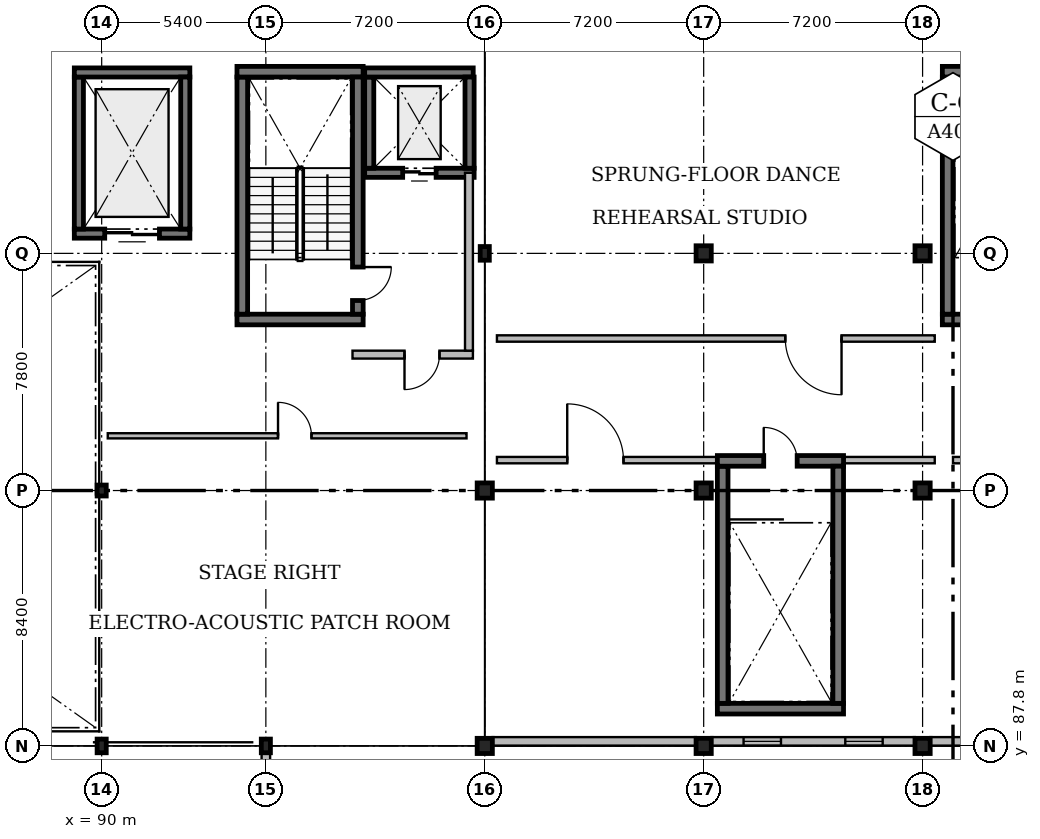
"""IFC4 building model, lengths in metres.
Left out: names, types, materials, properties, quantities, classifications, styles, units other than length and angle.
Written with IfcOpenShell. Run it as: python <this file> out.ifc"""

import sys

from ifc_helpers import new_model, si_unit, direction, frame, frame_2d, origin, origin_2d, place, context, subcontext, project, spatial, rectangle, i_section, extrude, element, fill, save


model = new_model("IFC4")
c1 = context("Model", 3, precision=1e-05, world=origin(), true_north=direction((0.0, 1.0)))
c2 = subcontext(c1, "Body", "Model", "MODEL_VIEW")
j1 = project(units=[si_unit("LENGTHUNIT", "METRE"), si_unit("PLANEANGLEUNIT", "RADIAN")], contexts=[c1])
p1 = place(None, origin())
s1 = spatial("IfcSite", under=j1, at=p1, CompositionType="ELEMENT")
p2 = place(p1, origin())
s2 = spatial("IfcBuilding", under=s1, at=p2, CompositionType="ELEMENT")
p3 = place(p2, frame((0.0, 0.0, 13.2)))
s3 = spatial("IfcBuildingStorey", under=s2, at=p3, CompositionType="ELEMENT", Elevation=13.2)
p4 = place(p3, frame((90.0, 87.8, 0.0), z_axis=(0.0, 0.0, 1.0), x_axis=(1.0, 0.0, 0.0)))
e1 = element("IfcColumn", 1, at=p4, inside=s3, PredefinedType="COLUMN", context=c2, shape_type="SweptSolid", body=[
    extrude(i_section(OverallWidth=0.3, OverallDepth=0.45, WebThickness=0.014, FlangeThickness=0.026, FilletRadius=0.027, at=origin_2d()), origin(), (0.0, 0.0, 1.0), 3.9),
])
p5 = place(p3, frame((90.0, 96.2, 0.0), z_axis=(0.0, 0.0, 1.0), x_axis=(1.0, 0.0, 0.0)))
e2 = element("IfcColumn", 2, at=p5, inside=s3, PredefinedType="COLUMN", context=c2, shape_type="SweptSolid", body=[
    extrude(i_section(OverallWidth=0.3, OverallDepth=0.36, WebThickness=0.012, FlangeThickness=0.022, FilletRadius=0.027, at=origin_2d()), origin(), (0.0, 0.0, 1.0), 3.9),
])
p6 = place(p3, frame((95.4, 87.8, 0.0), z_axis=(0.0, 0.0, 1.0), x_axis=(1.0, 0.0, 0.0)))
e3 = element("IfcColumn", 3, at=p6, inside=s3, PredefinedType="COLUMN", context=c2, shape_type="SweptSolid", body=[
    extrude(i_section(OverallWidth=0.3, OverallDepth=0.45, WebThickness=0.014, FlangeThickness=0.026, FilletRadius=0.027, at=origin_2d()), origin(), (0.0, 0.0, 1.0), 3.9),
])
for number, where, z_axis, x_axis in (
    (4, (102.6, 87.8, 0.0), (0.0, 0.0, 1.0), (1.0, 0.0, 0.0)),
    (5, (102.6, 96.2, 0.0), (0.0, 0.0, 1.0), (1.0, 0.0, 0.0)),
):
    element("IfcColumn", number, at=place(p3, frame(where, z_axis=z_axis, x_axis=x_axis)), inside=s3, PredefinedType="COLUMN", context=c2, shape_type="SweptSolid", body=[
        extrude(rectangle(XDim=0.5, YDim=0.5, at=origin_2d()), origin(), (0.0, 0.0, 1.0), 3.9),
    ])
p7 = place(p3, frame((102.6, 104.0, 0.0), z_axis=(0.0, 0.0, 1.0), x_axis=(1.0, 0.0, 0.0)))
e6 = element("IfcColumn", 6, at=p7, inside=s3, PredefinedType="COLUMN", context=c2, shape_type="SweptSolid", body=[
    extrude(i_section(OverallWidth=0.3, OverallDepth=0.45, WebThickness=0.014, FlangeThickness=0.026, FilletRadius=0.027, at=origin_2d()), origin(), (0.0, 0.0, 1.0), 3.9),
])
for number, where, z_axis, x_axis in (
    (7, (109.8, 87.8, 0.0), (0.0, 0.0, 1.0), (1.0, 0.0, 0.0)),
    (8, (109.8, 96.2, 0.0), (0.0, 0.0, 1.0), (1.0, 0.0, 0.0)),
    (9, (109.8, 104.0, 0.0), (0.0, 0.0, 1.0), (1.0, 0.0, 0.0)),
    (10, (117.0, 87.8, 0.0), (0.0, 0.0, 1.0), (1.0, 0.0, 0.0)),
    (11, (117.0, 96.2, 0.0), (0.0, 0.0, 1.0), (1.0, 0.0, 0.0)),
    (12, (117.0, 104.0, 0.0), (0.0, 0.0, 1.0), (1.0, 0.0, 0.0)),
):
    element("IfcColumn", number, at=place(p3, frame(where, z_axis=z_axis, x_axis=x_axis)), inside=s3, PredefinedType="COLUMN", context=c2, shape_type="SweptSolid", body=[
        extrude(rectangle(XDim=0.5, YDim=0.5, at=origin_2d()), origin(), (0.0, 0.0, 1.0), 3.71),
    ])
p8 = place(p3, frame((98.6, 101.825, 0.0), z_axis=(0.0, 0.0, 1.0), x_axis=(-1.0, 0.0, 0.0)))
e13 = element("IfcWall", 13, at=p8, inside=s3, PredefinedType="SOLIDWALL", context=c2, shape_type="SweptSolid", body=[
    extrude(rectangle(XDim=4.15, YDim=0.35, at=frame_2d((2.075, 0.0))), origin(), (0.0, 0.0, 1.0), 3.9),
])
p9 = place(p3, frame((94.625, 102.0, 0.0), z_axis=(0.0, 0.0, 1.0), x_axis=(0.0, 1.0, 0.0)))
e14 = element("IfcWall", 14, at=p9, inside=s3, PredefinedType="SOLIDWALL", context=c2, shape_type="SweptSolid", body=[
    extrude(rectangle(XDim=7.8, YDim=0.35, at=frame_2d((3.9, 0.0))), origin(), (0.0, 0.0, 1.0), 3.9),
])
p10 = place(p3, frame((94.45, 109.975, 0.0), z_axis=(0.0, 0.0, 1.0), x_axis=(1.0, 0.0, 0.0)))
e15 = element("IfcWall", 15, at=p10, inside=s3, PredefinedType="SOLIDWALL", context=c2, shape_type="SweptSolid", body=[
    extrude(rectangle(XDim=4.15, YDim=0.35, at=frame_2d((2.075, 0.0))), origin(), (0.0, 0.0, 1.0), 3.9),
])
p11 = place(p3, frame((98.425, 109.8, 0.0), z_axis=(0.0, 0.0, 1.0), x_axis=(0.0, -1.0, 0.0)))
e16 = element("IfcWall", 16, at=p11, inside=s3, PredefinedType="SOLIDWALL", context=c2, shape_type="SweptSolid", body=[
    extrude(rectangle(XDim=7.8, YDim=0.35, at=frame_2d((3.9, 0.0))), origin(), (0.0, 0.0, 1.0), 3.9),
])
p12 = place(p11, frame((6.25, 0.0, 0.0)))
e17 = element("IfcOpeningElement", 17, at=p12, cuts=e16, PredefinedType="OPENING", context=c2, shape_type="SweptSolid", body=[
    extrude(rectangle(XDim=1.1, YDim=2.15, at=frame_2d((0.55, 1.075))), frame((0.0, 0.195, 0.0), z_axis=(0.0, -1.0, 0.0), x_axis=(1.0, 0.0, 0.0)), (0.0, 0.0, 1.0), 0.39),
])
p13 = place(p3, frame((102.25, 106.65, 0.0), z_axis=(0.0, 0.0, 1.0), x_axis=(-1.0, 0.0, 0.0)))
e18 = element("IfcWall", 18, at=p13, inside=s3, PredefinedType="SOLIDWALL", context=c2, shape_type="SweptSolid", body=[
    extrude(rectangle(XDim=3.6, YDim=0.3, at=frame_2d((1.8, 0.0))), origin(), (0.0, 0.0, 1.0), 3.9),
])
p14 = place(p13, frame((1.25, 0.0, 0.0)))
e19 = element("IfcOpeningElement", 19, at=p14, cuts=e18, PredefinedType="OPENING", context=c2, shape_type="SweptSolid", body=[
    extrude(rectangle(XDim=1.1, YDim=2.1, at=frame_2d((0.55, 1.05))), frame((0.0, 0.17, 0.0), z_axis=(0.0, -1.0, 0.0), x_axis=(1.0, 0.0, 0.0)), (0.0, 0.0, 1.0), 0.34),
])
p15 = place(p3, frame((98.8, 106.8, 0.0), z_axis=(0.0, 0.0, 1.0), x_axis=(0.0, 1.0, 0.0)))
e20 = element("IfcWall", 20, at=p15, inside=s3, PredefinedType="SOLIDWALL", context=c2, shape_type="SweptSolid", body=[
    extrude(rectangle(XDim=3.0, YDim=0.3, at=frame_2d((1.5, 0.0))), origin(), (0.0, 0.0, 1.0), 3.9),
])
p16 = place(p3, frame((98.65, 109.95, 0.0), z_axis=(0.0, 0.0, 1.0), x_axis=(1.0, 0.0, 0.0)))
e21 = element("IfcWall", 21, at=p16, inside=s3, PredefinedType="SOLIDWALL", context=c2, shape_type="SweptSolid", body=[
    extrude(rectangle(XDim=3.57, YDim=0.3, at=frame_2d((1.785, 0.0))), origin(), (0.0, 0.0, 1.0), 3.9),
])
p17 = place(p3, frame((102.1, 109.8, 0.0), z_axis=(0.0, 0.0, 1.0), x_axis=(0.0, -1.0, 0.0)))
e22 = element("IfcWall", 22, at=p17, inside=s3, PredefinedType="SOLIDWALL", context=c2, shape_type="SweptSolid", body=[
    extrude(rectangle(XDim=3.0, YDim=0.3, at=frame_2d((1.5, 0.0))), origin(), (0.0, 0.0, 1.0), 3.9),
])
p18 = place(p3, frame((102.21, 100.67, 0.0), z_axis=(0.0, 0.0, 1.0), x_axis=(-1.0, 0.0, 0.0)))
e23 = element("IfcWall", 23, at=p18, inside=s3, PredefinedType="SOLIDWALL", context=c2, shape_type="SweptSolid", body=[
    extrude(rectangle(XDim=3.96, YDim=0.26, at=frame_2d((1.98, 0.0))), origin(), (0.0, 0.0, 1.0), 3.65),
])
p19 = place(p18, frame((1.1, 0.0, 0.0)))
e24 = element("IfcOpeningElement", 24, at=p19, cuts=e23, PredefinedType="OPENING", context=c2, shape_type="SweptSolid", body=[
    extrude(rectangle(XDim=1.15, YDim=2.2, at=frame_2d((0.575, 1.1))), frame((0.0, 0.15, 0.0), z_axis=(0.0, -1.0, 0.0), x_axis=(1.0, 0.0, 0.0)), (0.0, 0.0, 1.0), 0.3),
])
p20 = place(p3, frame((102.08, 106.65, 0.0), z_axis=(0.0, 0.0, 1.0), x_axis=(0.0, -1.0, 0.0)))
e25 = element("IfcWall", 25, at=p20, inside=s3, PredefinedType="SOLIDWALL", context=c2, shape_type="SweptSolid", body=[
    extrude(rectangle(XDim=5.85, YDim=0.26, at=frame_2d((2.925, 0.0))), origin(), (0.0, 0.0, 1.0), 3.65),
])
p21 = place(p3, frame((121.8, 101.825, 0.0), z_axis=(0.0, 0.0, 1.0), x_axis=(-1.0, 0.0, 0.0)))
e26 = element("IfcWall", 26, at=p21, inside=s3, PredefinedType="SOLIDWALL", context=c2, shape_type="SweptSolid", body=[
    extrude(rectangle(XDim=4.15, YDim=0.35, at=frame_2d((2.075, 0.0))), origin(), (0.0, 0.0, 1.0), 3.6),
])
p22 = place(p21, frame((1.525, 0.0, 0.0)))
e27 = element("IfcOpeningElement", 27, at=p22, cuts=e26, PredefinedType="OPENING", context=c2, shape_type="SweptSolid", body=[
    extrude(rectangle(XDim=1.1, YDim=2.15, at=frame_2d((0.55, 1.075))), frame((0.0, 0.195, 0.0), z_axis=(0.0, -1.0, 0.0), x_axis=(1.0, 0.0, 0.0)), (0.0, 0.0, 1.0), 0.39),
])
p23 = place(p3, frame((117.825, 102.0, 0.0), z_axis=(0.0, 0.0, 1.0), x_axis=(0.0, 1.0, 0.0)))
e28 = element("IfcWall", 28, at=p23, inside=s3, PredefinedType="SOLIDWALL", context=c2, shape_type="SweptSolid", body=[
    extrude(rectangle(XDim=7.8, YDim=0.35, at=frame_2d((3.9, 0.0))), origin(), (0.0, 0.0, 1.0), 3.6),
])
p24 = place(p3, frame((117.65, 109.975, 0.0), z_axis=(0.0, 0.0, 1.0), x_axis=(1.0, 0.0, 0.0)))
e29 = element("IfcWall", 29, at=p24, inside=s3, PredefinedType="SOLIDWALL", context=c2, shape_type="SweptSolid", body=[
    extrude(rectangle(XDim=4.15, YDim=0.35, at=frame_2d((2.075, 0.0))), origin(), (0.0, 0.0, 1.0), 3.6),
])
p25 = place(p3, frame((114.4, 89.025, 0.0), z_axis=(0.0, 0.0, 1.0), x_axis=(-1.0, 0.0, 0.0)))
e30 = element("IfcWall", 30, at=p25, inside=s3, PredefinedType="SOLIDWALL", context=c2, shape_type="SweptSolid", body=[
    extrude(rectangle(XDim=4.15, YDim=0.35, at=frame_2d((2.075, 0.0))), origin(), (0.0, 0.0, 1.0), 3.6),
])
p26 = place(p3, frame((110.425, 89.2, 0.0), z_axis=(0.0, 0.0, 1.0), x_axis=(0.0, 1.0, 0.0)))
e31 = element("IfcWall", 31, at=p26, inside=s3, PredefinedType="SOLIDWALL", context=c2, shape_type="SweptSolid", body=[
    extrude(rectangle(XDim=7.8, YDim=0.35, at=frame_2d((3.9, 0.0))), origin(), (0.0, 0.0, 1.0), 3.6),
])
p27 = place(p3, frame((110.25, 97.175, 0.0), z_axis=(0.0, 0.0, 1.0), x_axis=(1.0, 0.0, 0.0)))
e32 = element("IfcWall", 32, at=p27, inside=s3, PredefinedType="SOLIDWALL", context=c2, shape_type="SweptSolid", body=[
    extrude(rectangle(XDim=4.15, YDim=0.35, at=frame_2d((2.075, 0.0))), origin(), (0.0, 0.0, 1.0), 3.6),
])
p28 = place(p27, frame((1.525, 0.0, 0.0)))
e33 = element("IfcOpeningElement", 33, at=p28, cuts=e32, PredefinedType="OPENING", context=c2, shape_type="SweptSolid", body=[
    extrude(rectangle(XDim=1.1, YDim=2.15, at=frame_2d((0.55, 1.075))), frame((0.0, 0.195, 0.0), z_axis=(0.0, -1.0, 0.0), x_axis=(1.0, 0.0, 0.0)), (0.0, 0.0, 1.0), 0.39),
])
p29 = place(p3, frame((114.225, 97.0, 0.0), z_axis=(0.0, 0.0, 1.0), x_axis=(0.0, -1.0, 0.0)))
e34 = element("IfcWall", 34, at=p29, inside=s3, PredefinedType="SOLIDWALL", context=c2, shape_type="SweptSolid", body=[
    extrude(rectangle(XDim=7.8, YDim=0.35, at=frame_2d((3.9, 0.0))), origin(), (0.0, 0.0, 1.0), 3.6),
])
p30 = place(p3, frame((92.9, 104.65, 0.0), z_axis=(0.0, 0.0, 1.0), x_axis=(-1.0, 0.0, 0.0)))
e35 = element("IfcWall", 35, at=p30, inside=s3, PredefinedType="SOLIDWALL", context=c2, shape_type="SweptSolid", body=[
    extrude(rectangle(XDim=3.8, YDim=0.3, at=frame_2d((1.9, 0.0))), origin(), (0.0, 0.0, 1.0), 3.9),
])
p31 = place(p30, frame((1.0, 0.0, 0.0)))
e36 = element("IfcOpeningElement", 36, at=p31, cuts=e35, PredefinedType="OPENING", context=c2, shape_type="SweptSolid", body=[
    extrude(rectangle(XDim=1.8, YDim=2.4, at=frame_2d((0.9, 1.2))), frame((0.0, 0.17, 0.0), z_axis=(0.0, -1.0, 0.0), x_axis=(1.0, 0.0, 0.0)), (0.0, 0.0, 1.0), 0.34),
])
p32 = place(p3, frame((89.25, 104.8, 0.0), z_axis=(0.0, 0.0, 1.0), x_axis=(0.0, 1.0, 0.0)))
e37 = element("IfcWall", 37, at=p32, inside=s3, PredefinedType="SOLIDWALL", context=c2, shape_type="SweptSolid", body=[
    extrude(rectangle(XDim=5.0, YDim=0.3, at=frame_2d((2.5, 0.0))), origin(), (0.0, 0.0, 1.0), 3.9),
])
p33 = place(p3, frame((89.1, 109.95, 0.0), z_axis=(0.0, 0.0, 1.0), x_axis=(1.0, 0.0, 0.0)))
e38 = element("IfcWall", 38, at=p33, inside=s3, PredefinedType="SOLIDWALL", context=c2, shape_type="SweptSolid", body=[
    extrude(rectangle(XDim=3.8, YDim=0.3, at=frame_2d((1.9, 0.0))), origin(), (0.0, 0.0, 1.0), 3.9),
])
p34 = place(p3, frame((92.75, 109.8, 0.0), z_axis=(0.0, 0.0, 1.0), x_axis=(0.0, -1.0, 0.0)))
e39 = element("IfcWall", 39, at=p34, inside=s3, PredefinedType="SOLIDWALL", context=c2, shape_type="SweptSolid", body=[
    extrude(rectangle(XDim=5.0, YDim=0.3, at=frame_2d((2.5, 0.0))), origin(), (0.0, 0.0, 1.0), 3.9),
])
p35 = place(p3, frame((95.4, 85.387, -0.02), z_axis=(0.0, 0.0, 1.0), x_axis=(0.0, 1.0, 0.0)))
e40 = element("IfcWall", 40, at=p35, inside=s3, PredefinedType="SOLIDWALL", context=c2, shape_type="SweptSolid", body=[
    extrude(rectangle(XDim=2.183, YDim=0.28, at=frame_2d((1.092, 0.0))), origin(), (0.0, 0.0, 1.0), 2.505),
])
p36 = place(p35, frame((0.392, 0.0, 0.35)))
e41 = element("IfcOpeningElement", 41, at=p36, cuts=e40, PredefinedType="OPENING", context=c2, shape_type="SweptSolid", body=[
    extrude(rectangle(XDim=1.4, YDim=1.8, at=frame_2d((0.7, 0.9))), frame((0.0, 0.16, 0.0), z_axis=(0.0, -1.0, 0.0), x_axis=(1.0, 0.0, 0.0)), (0.0, 0.0, 1.0), 0.32),
])
p37 = place(p3, frame((102.855, 87.95, 0.0), z_axis=(0.0, 0.0, 1.0), x_axis=(1.0, 0.0, 0.0)))
e42 = element("IfcWall", 42, at=p37, inside=s3, PredefinedType="SOLIDWALL", context=c2, shape_type="SweptSolid", body=[
    extrude(rectangle(XDim=6.69, YDim=0.28, at=frame_2d((3.345, 0.0))), origin(), (0.0, 0.0, 1.0), 2.983),
])
p38 = place(p3, frame((110.055, 87.95, 0.0), z_axis=(0.0, 0.0, 1.0), x_axis=(1.0, 0.0, 0.0)))
e43 = element("IfcWall", 43, at=p38, inside=s3, PredefinedType="SOLIDWALL", context=c2, shape_type="SweptSolid", body=[
    extrude(rectangle(XDim=6.69, YDim=0.28, at=frame_2d((3.345, 0.0))), origin(), (0.0, 0.0, 1.0), 2.993),
])
p39 = place(p38, frame((1.058, 0.0, 0.95)))
e44 = element("IfcOpeningElement", 44, at=p39, cuts=e43, PredefinedType="OPENING", context=c2, shape_type="SweptSolid", body=[
    extrude(rectangle(XDim=1.23, YDim=1.9, at=frame_2d((0.615, 0.95))), frame((0.0, 0.16, 0.0), z_axis=(0.0, -1.0, 0.0), x_axis=(1.0, 0.0, 0.0)), (0.0, 0.0, 1.0), 0.32),
])
p40 = place(p38, frame((4.403, 0.0, 0.95)))
e45 = element("IfcOpeningElement", 45, at=p40, cuts=e43, PredefinedType="OPENING", context=c2, shape_type="SweptSolid", body=[
    extrude(rectangle(XDim=1.23, YDim=1.9, at=frame_2d((0.615, 0.95))), frame((0.0, 0.16, 0.0), z_axis=(0.0, -1.0, 0.0), x_axis=(1.0, 0.0, 0.0)), (0.0, 0.0, 1.0), 0.32),
])
p41 = place(p3, frame((117.255, 87.95, 0.0), z_axis=(0.0, 0.0, 1.0), x_axis=(1.0, 0.0, 0.0)))
e46 = element("IfcWall", 46, at=p41, inside=s3, PredefinedType="SOLIDWALL", context=c2, shape_type="SweptSolid", body=[
    extrude(rectangle(XDim=7.89, YDim=0.28, at=frame_2d((3.945, 0.0))), origin(), (0.0, 0.0, 1.0), 2.993),
])
p42 = place(p41, frame((1.343, 0.0, 0.95)))
e47 = element("IfcOpeningElement", 47, at=p42, cuts=e46, PredefinedType="OPENING", context=c2, shape_type="SweptSolid", body=[
    extrude(rectangle(XDim=1.26, YDim=1.65, at=frame_2d((0.63, 0.825))), frame((0.0, 0.16, 0.0), z_axis=(0.0, -1.0, 0.0), x_axis=(1.0, 0.0, 0.0)), (0.0, 0.0, 1.0), 0.32),
])
p43 = place(p41, frame((5.288, 0.0, 0.95)))
e48 = element("IfcOpeningElement", 48, at=p43, cuts=e46, PredefinedType="OPENING", context=c2, shape_type="SweptSolid", body=[
    extrude(rectangle(XDim=1.26, YDim=1.65, at=frame_2d((0.63, 0.825))), frame((0.0, 0.16, 0.0), z_axis=(0.0, -1.0, 0.0), x_axis=(1.0, 0.0, 0.0)), (0.0, 0.0, 1.0), 0.32),
])
p44 = place(p3, frame((90.2, 98.0, 0.0), z_axis=(0.0, 0.0, 1.0), x_axis=(1.0, 0.0, 0.0)))
e49 = element("IfcWall", 49, at=p44, inside=s3, PredefinedType="PARTITIONING", context=c2, shape_type="SweptSolid", body=[
    extrude(rectangle(XDim=11.8, YDim=0.17, at=frame_2d((5.9, 0.0))), origin(), (0.0, 0.0, 1.0), 3.65),
])
p45 = place(p44, frame((5.6, 0.0, 0.0)))
e50 = element("IfcOpeningElement", 50, at=p45, cuts=e49, PredefinedType="OPENING", context=c2, shape_type="SweptSolid", body=[
    extrude(rectangle(XDim=1.1, YDim=2.1, at=frame_2d((0.55, 1.05))), frame((0.0, 0.105, 0.0), z_axis=(0.0, -1.0, 0.0), x_axis=(1.0, 0.0, 0.0)), (0.0, 0.0, 1.0), 0.21),
])
p46 = place(p3, frame((103.0, 97.2, 0.0), z_axis=(0.0, 0.0, 1.0), x_axis=(1.0, 0.0, 0.0)))
e51 = element("IfcWall", 51, at=p46, inside=s3, PredefinedType="PARTITIONING", context=c2, shape_type="SweptSolid", body=[
    extrude(rectangle(XDim=7.21, YDim=0.21, at=frame_2d((3.605, 0.0))), origin(), (0.0, 0.0, 1.0), 3.66),
])
p47 = place(p46, frame((2.312, 0.0, 0.0)))
e52 = element("IfcOpeningElement", 52, at=p47, cuts=e51, PredefinedType="OPENING", context=c2, shape_type="SweptSolid", body=[
    extrude(rectangle(XDim=1.85, YDim=2.35, at=frame_2d((0.925, 1.175))), frame((0.0, 0.125, 0.0), z_axis=(0.0, -1.0, 0.0), x_axis=(1.0, 0.0, 0.0)), (0.0, 0.0, 1.0), 0.25),
])
p48 = place(p3, frame((114.44, 97.2, 0.0), z_axis=(0.0, 0.0, 1.0), x_axis=(1.0, 0.0, 0.0)))
e53 = element("IfcWall", 53, at=p48, inside=s3, PredefinedType="PARTITIONING", context=c2, shape_type="SweptSolid", body=[
    extrude(rectangle(XDim=2.96, YDim=0.21, at=frame_2d((1.48, 0.0))), origin(), (0.0, 0.0, 1.0), 3.66),
])
p49 = place(p3, frame((118.0, 97.2, 0.0), z_axis=(0.0, 0.0, 1.0), x_axis=(1.0, 0.0, 0.0)))
e54 = element("IfcWall", 54, at=p49, inside=s3, PredefinedType="PARTITIONING", context=c2, shape_type="SweptSolid", body=[
    extrude(rectangle(XDim=23.6, YDim=0.21, at=frame_2d((11.8, 0.0))), origin(), (0.0, 0.0, 1.0), 3.66),
])
p50 = place(p49, frame((19.055, 0.0, 0.0)))
e55 = element("IfcOpeningElement", 55, at=p50, cuts=e54, PredefinedType="OPENING", context=c2, shape_type="SweptSolid", body=[
    extrude(rectangle(XDim=1.95, YDim=2.4, at=frame_2d((0.975, 1.2))), frame((0.0, 0.125, 0.0), z_axis=(0.0, -1.0, 0.0), x_axis=(1.0, 0.0, 0.0)), (0.0, 0.0, 1.0), 0.25),
])
p51 = place(p3, frame((117.4, 101.2, 0.0), z_axis=(0.0, 0.0, 1.0), x_axis=(-1.0, 0.0, 0.0)))
e56 = element("IfcWall", 56, at=p51, inside=s3, PredefinedType="PARTITIONING", context=c2, shape_type="SweptSolid", body=[
    extrude(rectangle(XDim=14.4, YDim=0.21, at=frame_2d((7.2, 0.0))), origin(), (0.0, 0.0, 1.0), 3.66),
])
p52 = place(p51, frame((3.066, 0.0, 0.0)))
e57 = element("IfcOpeningElement", 57, at=p52, cuts=e56, PredefinedType="OPENING", context=c2, shape_type="SweptSolid", body=[
    extrude(rectangle(XDim=1.85, YDim=2.35, at=frame_2d((0.925, 1.175))), frame((0.0, 0.125, 0.0), z_axis=(0.0, -1.0, 0.0), x_axis=(1.0, 0.0, 0.0)), (0.0, 0.0, 1.0), 0.25),
])
p53 = place(p12, origin())
e58 = element("IfcDoor", 58, at=p53, inside=s3, OperationType="SINGLE_SWING_LEFT", PredefinedType="DOOR", context=c2, shape_type="SweptSolid", body=[
    extrude(rectangle(XDim=1.1, YDim=2.15, at=frame_2d((0.55, 1.075))), frame((0.0, 0.025, 0.0), z_axis=(0.0, -1.0, 0.0), x_axis=(1.0, 0.0, 0.0)), (0.0, 0.0, 1.0), 0.05),
])
fill(e17, e58)
p54 = place(p14, origin())
e59 = element("IfcDoor", 59, at=p54, inside=s3, OperationType="DOUBLE_DOOR_SLIDING", PredefinedType="DOOR", context=c2, shape_type="SweptSolid", body=[
    extrude(rectangle(XDim=1.1, YDim=2.1, at=frame_2d((0.55, 1.05))), frame((0.0, 0.025, 0.0), z_axis=(0.0, -1.0, 0.0), x_axis=(1.0, 0.0, 0.0)), (0.0, 0.0, 1.0), 0.05),
])
fill(e19, e59)
p55 = place(p19, origin())
e60 = element("IfcDoor", 60, at=p55, inside=s3, OperationType="SINGLE_SWING_RIGHT", PredefinedType="DOOR", context=c2, shape_type="SweptSolid", body=[
    extrude(rectangle(XDim=1.15, YDim=2.2, at=frame_2d((0.575, 1.1))), frame((0.0, 0.025, 0.0), z_axis=(0.0, -1.0, 0.0), x_axis=(1.0, 0.0, 0.0)), (0.0, 0.0, 1.0), 0.05),
])
fill(e24, e60)
p56 = place(p28, origin())
e61 = element("IfcDoor", 61, at=p56, inside=s3, OperationType="SINGLE_SWING_LEFT", PredefinedType="DOOR", context=c2, shape_type="SweptSolid", body=[
    extrude(rectangle(XDim=1.1, YDim=2.15, at=frame_2d((0.55, 1.075))), frame((0.0, 0.025, 0.0), z_axis=(0.0, -1.0, 0.0), x_axis=(1.0, 0.0, 0.0)), (0.0, 0.0, 1.0), 0.05),
])
fill(e33, e61)
p57 = place(p31, origin())
e62 = element("IfcDoor", 62, at=p57, inside=s3, OperationType="DOUBLE_DOOR_SLIDING", PredefinedType="DOOR", context=c2, shape_type="SweptSolid", body=[
    extrude(rectangle(XDim=1.8, YDim=2.4, at=frame_2d((0.9, 1.2))), frame((0.0, 0.025, 0.0), z_axis=(0.0, -1.0, 0.0), x_axis=(1.0, 0.0, 0.0)), (0.0, 0.0, 1.0), 0.05),
])
fill(e36, e62)
p58 = place(p39, origin())
e63 = element("IfcWindow", 63, at=p58, inside=s3, PartitioningType="SINGLE_PANEL", PredefinedType="WINDOW", context=c2, shape_type="SweptSolid", body=[
    extrude(rectangle(XDim=1.23, YDim=1.9, at=frame_2d((0.615, 0.95))), frame((0.0, 0.03, 0.0), z_axis=(0.0, -1.0, 0.0), x_axis=(1.0, 0.0, 0.0)), (0.0, 0.0, 1.0), 0.06),
])
fill(e44, e63)
p59 = place(p40, origin())
e64 = element("IfcWindow", 64, at=p59, inside=s3, PartitioningType="SINGLE_PANEL", PredefinedType="WINDOW", context=c2, shape_type="SweptSolid", body=[
    extrude(rectangle(XDim=1.23, YDim=1.9, at=frame_2d((0.615, 0.95))), frame((0.0, 0.03, 0.0), z_axis=(0.0, -1.0, 0.0), x_axis=(1.0, 0.0, 0.0)), (0.0, 0.0, 1.0), 0.06),
])
fill(e45, e64)
p60 = place(p45, origin())
e65 = element("IfcDoor", 65, at=p60, inside=s3, OperationType="SINGLE_SWING_LEFT", PredefinedType="DOOR", context=c2, shape_type="SweptSolid", body=[
    extrude(rectangle(XDim=1.1, YDim=2.1, at=frame_2d((0.55, 1.05))), frame((0.0, 0.025, 0.0), z_axis=(0.0, -1.0, 0.0), x_axis=(1.0, 0.0, 0.0)), (0.0, 0.0, 1.0), 0.05),
])
fill(e50, e65)
p61 = place(p47, origin())
e66 = element("IfcDoor", 66, at=p61, inside=s3, OperationType="DOUBLE_DOOR_SINGLE_SWING", PredefinedType="DOOR", context=c2, shape_type="SweptSolid", body=[
    extrude(rectangle(XDim=1.85, YDim=2.35, at=frame_2d((0.925, 1.175))), frame((0.0, 0.025, 0.0), z_axis=(0.0, -1.0, 0.0), x_axis=(1.0, 0.0, 0.0)), (0.0, 0.0, 1.0), 0.05),
])
fill(e52, e66)
p62 = place(p52, origin())
e67 = element("IfcDoor", 67, at=p62, inside=s3, OperationType="DOUBLE_DOOR_SINGLE_SWING", PredefinedType="DOOR", context=c2, shape_type="SweptSolid", body=[
    extrude(rectangle(XDim=1.85, YDim=2.35, at=frame_2d((0.925, 1.175))), frame((0.0, 0.025, 0.0), z_axis=(0.0, -1.0, 0.0), x_axis=(1.0, 0.0, 0.0)), (0.0, 0.0, 1.0), 0.05),
])
fill(e57, e67)
save(model, sys.argv[1])
